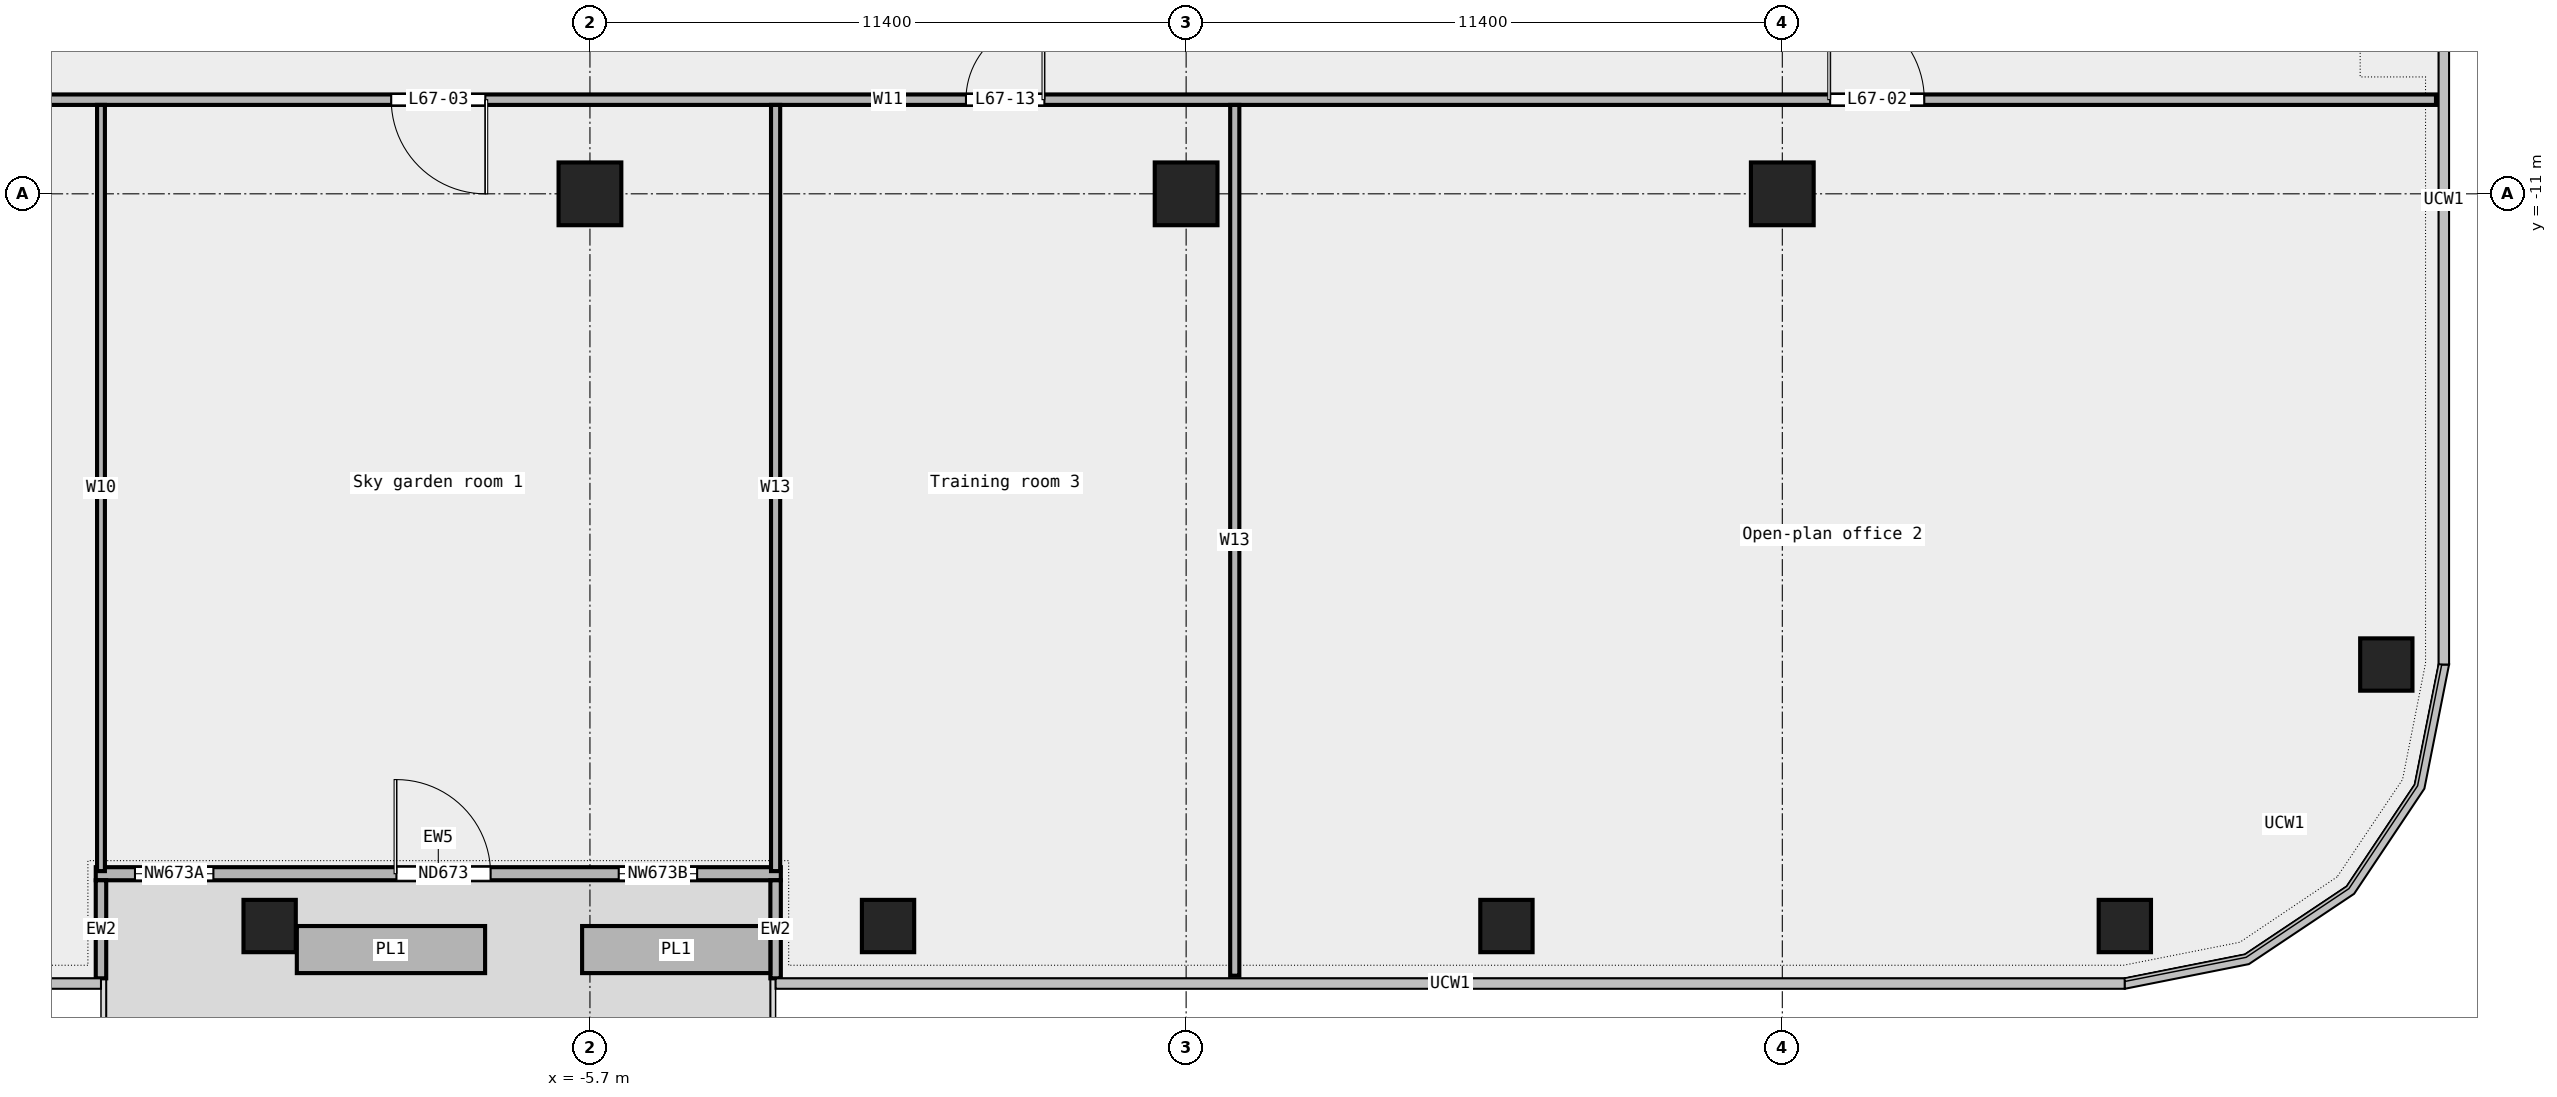
"""IFC4 building model, lengths in metres.
Left out: names, types, materials, properties, quantities, classifications, styles, units other than length and angle.
Written with IfcOpenShell. Run it as: python <this file> out.ifc"""

import sys

from ifc_helpers import new_model, si_unit, direction, frame, frame_2d, origin, origin_2d, place, context, subcontext, project, spatial, rectangle, extrude, element, fill, save


model = new_model("IFC4")
c1 = context("Model", 3, precision=1e-05, world=origin(), true_north=direction((0.0, 1.0)))
c2 = subcontext(c1, "Body", "Model", "MODEL_VIEW")
j1 = project(units=[si_unit("LENGTHUNIT", "METRE"), si_unit("PLANEANGLEUNIT", "RADIAN")], contexts=[c1])
p1 = place(None, origin())
s1 = spatial("IfcSite", under=j1, at=p1, CompositionType="ELEMENT")
p2 = place(p1, origin())
s2 = spatial("IfcBuilding", under=s1, at=p2, CompositionType="ELEMENT")
p3 = place(p2, frame((0.0, 0.0, 307.4)))
s3 = spatial("IfcBuildingStorey", under=s2, at=p3, CompositionType="ELEMENT", Elevation=307.4)
for number, where, z_axis, x_axis in (
    (1, (-11.825, -25.0, 0.0), (0.0, 0.0, 1.0), (1.0, 0.0, 0.0)),
    (2, (0.0, -25.0, 0.0), (0.0, 0.0, 1.0), (1.0, 0.0, 0.0)),
    (3, (11.825, -25.0, 0.0), (0.0, 0.0, 1.0), (1.0, 0.0, 0.0)),
    (4, (23.65, -25.0, 0.0), (0.0, 0.0, 1.0), (1.0, 0.0, 0.0)),
    (5, (28.65, -20.0, 0.0), (0.0, 0.0, 1.0), (1.0, 0.0, 0.0)),
):
    element("IfcColumn", number, at=place(p3, frame(where, z_axis=z_axis, x_axis=x_axis)), inside=s3, PredefinedType="COLUMN", context=c2, shape_type="SweptSolid", body=[
        extrude(rectangle(XDim=1.0, YDim=1.0, at=origin_2d()), origin(), (0.0, 0.0, 1.0), 3.6),
    ])
for number, where, z_axis, x_axis in (
    (6, (-5.7, -11.0, 0.0), (0.0, 0.0, 1.0), (1.0, 0.0, 0.0)),
    (7, (5.7, -11.0, 0.0), (0.0, 0.0, 1.0), (1.0, 0.0, 0.0)),
    (8, (17.1, -11.0, 0.0), (0.0, 0.0, 1.0), (1.0, 0.0, 0.0)),
):
    element("IfcColumn", number, at=place(p3, frame(where, z_axis=z_axis, x_axis=x_axis)), inside=s3, PredefinedType="COLUMN", context=c2, shape_type="SweptSolid", body=[
        extrude(rectangle(XDim=1.2, YDim=1.2, at=origin_2d()), origin(), (0.0, 0.0, 1.0), 3.6),
    ])
p4 = place(p3, frame((-15.15, -24.0, 0.0), z_axis=(0.0, 0.0, 1.0), x_axis=(1.0, 0.0, 0.0)))
e9 = element("IfcWall", 9, at=p4, inside=s3, PredefinedType="STANDARD", context=c2, shape_type="SweptSolid", body=[
    extrude(rectangle(XDim=13.1, YDim=0.25, at=frame_2d((6.55, 0.0))), origin(), (0.0, 0.0, 1.0), 3.6),
])
p5 = place(p4, frame((0.75, 0.0, 0.45)))
e10 = element("IfcOpeningElement", 10, at=p5, cuts=e9, PredefinedType="OPENING", context=c2, shape_type="SweptSolid", body=[
    extrude(rectangle(XDim=1.5, YDim=2.4, at=frame_2d((0.75, 1.2))), frame((0.0, 0.137, 0.0), z_axis=(0.0, -1.0, 0.0), x_axis=(1.0, 0.0, 0.0)), (0.0, 0.0, 1.0), 0.274),
])
p6 = place(p4, frame((5.75, 0.0, 0.0)))
e11 = element("IfcOpeningElement", 11, at=p6, cuts=e9, PredefinedType="OPENING", context=c2, shape_type="SweptSolid", body=[
    extrude(rectangle(XDim=1.8, YDim=2.4, at=frame_2d((0.9, 1.2))), frame((0.0, 0.137, 0.0), z_axis=(0.0, -1.0, 0.0), x_axis=(1.0, 0.0, 0.0)), (0.0, 0.0, 1.0), 0.274),
])
p7 = place(p4, frame((10.0, 0.0, 0.45)))
e12 = element("IfcOpeningElement", 12, at=p7, cuts=e9, PredefinedType="OPENING", context=c2, shape_type="SweptSolid", body=[
    extrude(rectangle(XDim=1.5, YDim=2.4, at=frame_2d((0.75, 1.2))), frame((0.0, 0.137, 0.0), z_axis=(0.0, -1.0, 0.0), x_axis=(1.0, 0.0, 0.0)), (0.0, 0.0, 1.0), 0.274),
])
for number, where, z_axis, x_axis in (
    (13, (-15.05, -26.0, 0.0), (0.0, 0.0, 1.0), (0.0, 1.0, 0.0)),
    (14, (-2.15, -26.0, 0.0), (0.0, 0.0, 1.0), (0.0, 1.0, 0.0)),
):
    element("IfcWall", number, at=place(p3, frame(where, z_axis=z_axis, x_axis=x_axis)), inside=s3, PredefinedType="STANDARD", context=c2, shape_type="SweptSolid", body=[
        extrude(rectangle(XDim=1.875, YDim=0.2, at=frame_2d((0.938, 0.0))), origin(), (0.0, 0.0, 1.0), 3.6),
    ])
for number, where, z_axis, x_axis in (
    (15, (-11.305, -25.45, 0.0), (0.0, 0.0, 1.0), (1.0, 0.0, 0.0)),
    (16, (-5.85, -25.45, 0.0), (0.0, 0.0, 1.0), (1.0, 0.0, 0.0)),
):
    element("IfcWall", number, at=place(p3, frame(where, z_axis=z_axis, x_axis=x_axis)), inside=s3, PredefinedType="STANDARD", context=c2, shape_type="SweptSolid", body=[
        extrude(rectangle(XDim=3.6, YDim=0.9, at=frame_2d((1.8, 0.0))), origin(), (0.0, 0.0, 1.0), 0.7),
    ])
p8 = place(p3, frame((-29.6, -9.2, 0.0), z_axis=(0.0, 0.0, 1.0), x_axis=(1.0, 0.0, 0.0)))
e17 = element("IfcWall", 17, at=p8, inside=s3, PredefinedType="PARTITIONING", context=c2, shape_type="SweptSolid", body=[
    extrude(rectangle(XDim=59.2, YDim=0.2, at=frame_2d((29.6, 0.0))), origin(), (0.0, 0.0, 1.0), 3.6),
])
p9 = place(p8, frame((47.615, 0.0, 0.0)))
e18 = element("IfcOpeningElement", 18, at=p9, cuts=e17, PredefinedType="OPENING", context=c2, shape_type="SweptSolid", body=[
    extrude(rectangle(XDim=1.8, YDim=2.1, at=frame_2d((0.9, 1.05))), frame((0.0, 0.112, 0.0), z_axis=(0.0, -1.0, 0.0), x_axis=(1.0, 0.0, 0.0)), (0.0, 0.0, 1.0), 0.224),
])
p10 = place(p8, frame((20.1, 0.0, 0.0)))
e19 = element("IfcOpeningElement", 19, at=p10, cuts=e17, PredefinedType="OPENING", context=c2, shape_type="SweptSolid", body=[
    extrude(rectangle(XDim=1.8, YDim=2.1, at=frame_2d((0.9, 1.05))), frame((0.0, 0.112, 0.0), z_axis=(0.0, -1.0, 0.0), x_axis=(1.0, 0.0, 0.0)), (0.0, 0.0, 1.0), 0.224),
])
p11 = place(p8, frame((6.475, 0.0, 0.0)))
e20 = element("IfcOpeningElement", 20, at=p11, cuts=e17, PredefinedType="OPENING", context=c2, shape_type="SweptSolid", body=[
    extrude(rectangle(XDim=1.8, YDim=2.1, at=frame_2d((0.9, 1.05))), frame((0.0, 0.112, 0.0), z_axis=(0.0, -1.0, 0.0), x_axis=(1.0, 0.0, 0.0)), (0.0, 0.0, 1.0), 0.224),
])
p12 = place(p8, frame((31.09, 0.0, 0.0)))
e21 = element("IfcOpeningElement", 21, at=p12, cuts=e17, PredefinedType="OPENING", context=c2, shape_type="SweptSolid", body=[
    extrude(rectangle(XDim=1.5, YDim=2.1, at=frame_2d((0.75, 1.05))), frame((0.0, 0.112, 0.0), z_axis=(0.0, -1.0, 0.0), x_axis=(1.0, 0.0, 0.0)), (0.0, 0.0, 1.0), 0.224),
])
p13 = place(p3, frame((-15.05, -23.95, 0.0), z_axis=(0.0, 0.0, 1.0), x_axis=(0.0, 1.0, 0.0)))
e22 = element("IfcWall", 22, at=p13, inside=s3, PredefinedType="PARTITIONING", context=c2, shape_type="SweptSolid", body=[
    extrude(rectangle(XDim=14.65, YDim=0.15, at=frame_2d((7.325, 0.0))), origin(), (0.0, 0.0, 1.0), 3.6),
])
p14 = place(p3, frame((-2.15, -23.95, 0.0), z_axis=(0.0, 0.0, 1.0), x_axis=(0.0, 1.0, 0.0)))
e23 = element("IfcWall", 23, at=p14, inside=s3, PredefinedType="PARTITIONING", context=c2, shape_type="SweptSolid", body=[
    extrude(rectangle(XDim=14.65, YDim=0.175, at=frame_2d((7.325, 0.0))), origin(), (0.0, 0.0, 1.0), 3.6),
])
p15 = place(p3, frame((6.63, -25.95, 0.0), z_axis=(0.0, 0.0, 1.0), x_axis=(0.0, 1.0, 0.0)))
e24 = element("IfcWall", 24, at=p15, inside=s3, PredefinedType="PARTITIONING", context=c2, shape_type="SweptSolid", body=[
    extrude(rectangle(XDim=16.65, YDim=0.175, at=frame_2d((8.325, 0.0))), origin(), (0.0, 0.0, 1.0), 3.6),
])
p16 = place(p5, origin())
e25 = element("IfcWindow", 25, at=p16, inside=s3, PartitioningType="SINGLE_PANEL", PredefinedType="WINDOW", context=c2, shape_type="SweptSolid", body=[
    extrude(rectangle(XDim=1.5, YDim=2.4, at=frame_2d((0.75, 1.2))), frame((0.0, 0.03, 0.0), z_axis=(0.0, -1.0, 0.0), x_axis=(1.0, 0.0, 0.0)), (0.0, 0.0, 1.0), 0.06),
])
fill(e10, e25)
p17 = place(p6, origin())
e26 = element("IfcDoor", 26, at=p17, inside=s3, OperationType="DOUBLE_DOOR_SINGLE_SWING", PredefinedType="DOOR", context=c2, shape_type="SweptSolid", body=[
    extrude(rectangle(XDim=1.8, YDim=2.4, at=frame_2d((0.9, 1.2))), frame((0.0, 0.025, 0.0), z_axis=(0.0, -1.0, 0.0), x_axis=(1.0, 0.0, 0.0)), (0.0, 0.0, 1.0), 0.05),
])
fill(e11, e26)
p18 = place(p7, origin())
e27 = element("IfcWindow", 27, at=p18, inside=s3, PartitioningType="SINGLE_PANEL", PredefinedType="WINDOW", context=c2, shape_type="SweptSolid", body=[
    extrude(rectangle(XDim=1.5, YDim=2.4, at=frame_2d((0.75, 1.2))), frame((0.0, 0.03, 0.0), z_axis=(0.0, -1.0, 0.0), x_axis=(1.0, 0.0, 0.0)), (0.0, 0.0, 1.0), 0.06),
])
fill(e12, e27)
p19 = place(p9, origin())
e28 = element("IfcDoor", 28, at=p19, inside=s3, OperationType="DOUBLE_DOOR_SINGLE_SWING", PredefinedType="DOOR", context=c2, shape_type="SweptSolid", body=[
    extrude(rectangle(XDim=1.8, YDim=2.1, at=frame_2d((0.9, 1.05))), frame((0.0, 0.025, 0.0), z_axis=(0.0, -1.0, 0.0), x_axis=(1.0, 0.0, 0.0)), (0.0, 0.0, 1.0), 0.05),
])
fill(e18, e28)
p20 = place(p10, origin())
e29 = element("IfcDoor", 29, at=p20, inside=s3, OperationType="DOUBLE_DOOR_SINGLE_SWING", PredefinedType="DOOR", context=c2, shape_type="SweptSolid", body=[
    extrude(rectangle(XDim=1.8, YDim=2.1, at=frame_2d((0.9, 1.05))), frame((0.0, 0.025, 0.0), z_axis=(0.0, -1.0, 0.0), x_axis=(1.0, 0.0, 0.0)), (0.0, 0.0, 1.0), 0.05),
])
fill(e19, e29)
p21 = place(p12, origin())
e30 = element("IfcDoor", 30, at=p21, inside=s3, OperationType="DOUBLE_DOOR_SINGLE_SWING", PredefinedType="DOOR", context=c2, shape_type="SweptSolid", body=[
    extrude(rectangle(XDim=1.5, YDim=2.1, at=frame_2d((0.75, 1.05))), frame((0.0, 0.025, 0.0), z_axis=(0.0, -1.0, 0.0), x_axis=(1.0, 0.0, 0.0)), (0.0, 0.0, 1.0), 0.05),
])
fill(e21, e30)
save(model, sys.argv[1])
